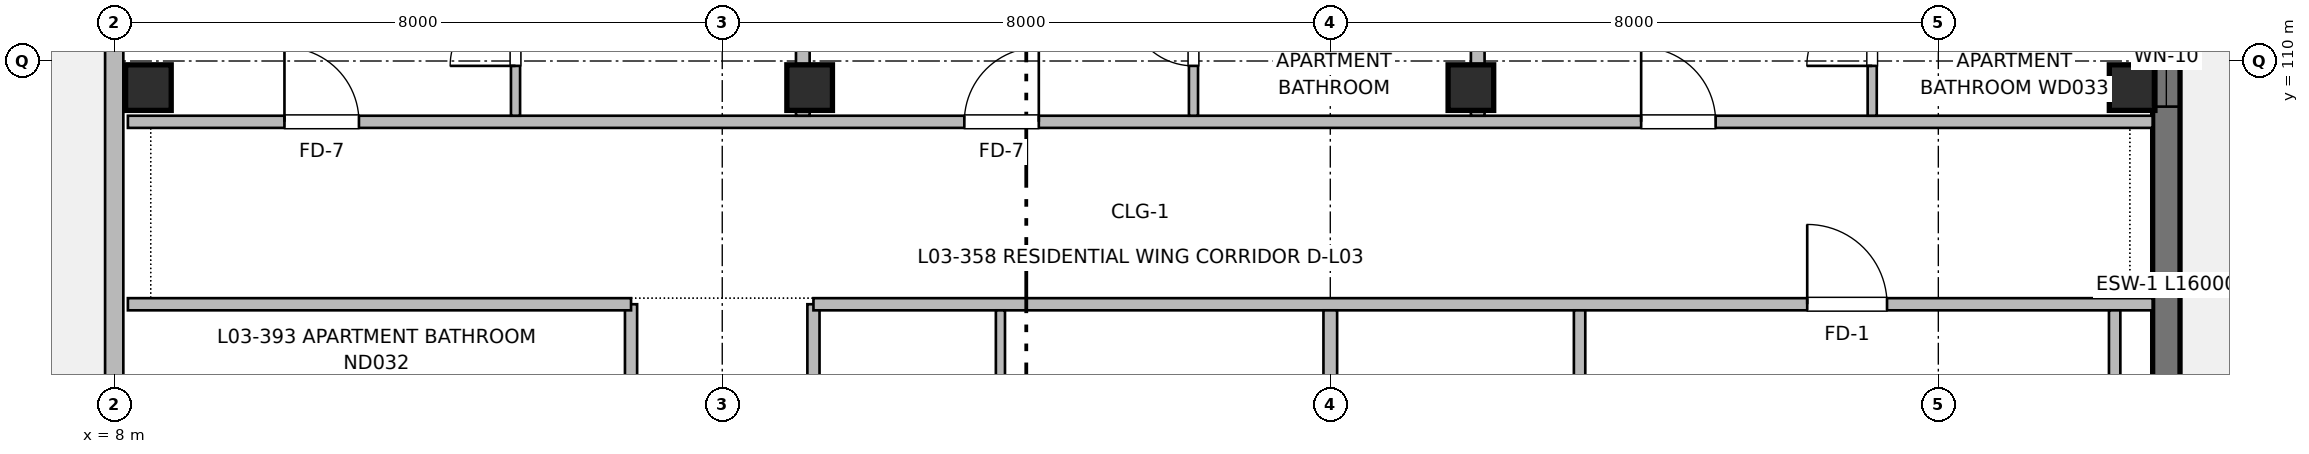
"""IFC4 building model, lengths in metres.
Left out: names, types, materials, properties, quantities, classifications, styles, units other than length and angle.
Written with IfcOpenShell. Run it as: python <this file> out.ifc"""

import sys

from ifc_helpers import new_model, si_unit, direction, frame, frame_2d, origin, origin_2d, place, context, subcontext, project, spatial, rectangle, extrude, element, fill, save


model = new_model("IFC4")
c1 = context("Model", 3, precision=1e-05, world=origin(), true_north=direction((0.0, 1.0)))
c2 = subcontext(c1, "Body", "Model", "MODEL_VIEW")
j1 = project(units=[si_unit("LENGTHUNIT", "METRE"), si_unit("PLANEANGLEUNIT", "RADIAN")], contexts=[c1])
p1 = place(None, origin())
s1 = spatial("IfcSite", under=j1, at=p1, CompositionType="ELEMENT")
p2 = place(p1, origin())
s2 = spatial("IfcBuilding", under=s1, at=p2, CompositionType="ELEMENT")
p3 = place(p2, frame((0.0, 0.0, 10.56)))
s3 = spatial("IfcBuildingStorey", under=s2, at=p3, CompositionType="ELEMENT", Elevation=10.56)
for number, where, z_axis, x_axis in (
    (1, (8.45, 109.65, 0.0), (0.0, 0.0, 1.0), (1.0, 0.0, 0.0)),
    (2, (17.15, 109.65, 0.0), (0.0, 0.0, 1.0), (1.0, 0.0, 0.0)),
    (3, (25.85, 109.65, 0.0), (0.0, 0.0, 1.0), (1.0, 0.0, 0.0)),
    (4, (34.55, 109.65, 0.0), (0.0, 0.0, 1.0), (1.0, 0.0, 0.0)),
):
    element("IfcColumn", number, at=place(p3, frame(where, z_axis=z_axis, x_axis=x_axis)), inside=s3, PredefinedType="COLUMN", context=c2, shape_type="SweptSolid", body=[
        extrude(rectangle(XDim=0.6, YDim=0.6, at=origin_2d()), origin(), (0.0, 0.0, 1.0), 3.2),
    ])
p4 = place(p3, frame((35.0, 116.0, 0.0), z_axis=(0.0, 0.0, 1.0), x_axis=(0.0, -1.0, 0.0)))
e5 = element("IfcWall", 5, at=p4, inside=s3, PredefinedType="SHEAR", context=c2, shape_type="SweptSolid", body=[
    extrude(rectangle(XDim=16.0, YDim=0.36, at=frame_2d((8.0, 0.0))), origin(), (0.0, 0.0, 1.0), 2.98),
])
p5 = place(p4, frame((2.95, 0.0, 0.0)))
e6 = element("IfcOpeningElement", 6, at=p5, cuts=e5, PredefinedType="OPENING", context=c2, shape_type="SweptSolid", body=[
    extrude(rectangle(XDim=1.2, YDim=2.2, at=frame_2d((0.6, 1.1))), frame((0.0, 0.19, 0.0), z_axis=(0.0, -1.0, 0.0), x_axis=(1.0, 0.0, 0.0)), (0.0, 0.0, 1.0), 0.38),
])
p6 = place(p4, frame((5.3, 0.0, 0.82)))
e7 = element("IfcOpeningElement", 7, at=p6, cuts=e5, PredefinedType="OPENING", context=c2, shape_type="SweptSolid", body=[
    extrude(rectangle(XDim=1.3, YDim=1.4, at=frame_2d((0.65, 0.7))), frame((0.0, 0.19, 0.0), z_axis=(0.0, -1.0, 0.0), x_axis=(1.0, 0.0, 0.0)), (0.0, 0.0, 1.0), 0.38),
])
p7 = place(p4, frame((11.3, 0.0, 0.87)))
e8 = element("IfcOpeningElement", 8, at=p7, cuts=e5, PredefinedType="OPENING", context=c2, shape_type="SweptSolid", body=[
    extrude(rectangle(XDim=1.4, YDim=1.35, at=frame_2d((0.7, 0.675))), frame((0.0, 0.19, 0.0), z_axis=(0.0, -1.0, 0.0), x_axis=(1.0, 0.0, 0.0)), (0.0, 0.0, 1.0), 0.38),
])
p8 = place(p3, frame((8.0, 56.0, 0.0), z_axis=(0.0, 0.0, 1.0), x_axis=(0.0, 1.0, 0.0)))
e9 = element("IfcWall", 9, at=p8, inside=s3, PredefinedType="SOLIDWALL", context=c2, shape_type="SweptSolid", body=[
    extrude(rectangle(XDim=60.0, YDim=0.24, at=frame_2d((30.0, 0.0))), origin(), (0.0, 0.0, 1.0), 2.98),
])
p9 = place(p8, frame((4.886, 0.0, 0.0)))
e10 = element("IfcOpeningElement", 10, at=p9, cuts=e9, PredefinedType="OPENING", context=c2, shape_type="SweptSolid", body=[
    extrude(rectangle(XDim=1.2, YDim=2.2, at=frame_2d((0.6, 1.1))), frame((0.0, 0.13, 0.0), z_axis=(0.0, -1.0, 0.0), x_axis=(1.0, 0.0, 0.0)), (0.0, 0.0, 1.0), 0.26),
])
p10 = place(p8, frame((12.157, 0.0, 0.87)))
e11 = element("IfcOpeningElement", 11, at=p10, cuts=e9, PredefinedType="OPENING", context=c2, shape_type="SweptSolid", body=[
    extrude(rectangle(XDim=1.4, YDim=1.35, at=frame_2d((0.7, 0.675))), frame((0.0, 0.13, 0.0), z_axis=(0.0, -1.0, 0.0), x_axis=(1.0, 0.0, 0.0)), (0.0, 0.0, 1.0), 0.26),
])
p11 = place(p8, frame((20.354, 0.0, 0.87)))
e12 = element("IfcOpeningElement", 12, at=p11, cuts=e9, PredefinedType="OPENING", context=c2, shape_type="SweptSolid", body=[
    extrude(rectangle(XDim=1.25, YDim=1.35, at=frame_2d((0.625, 0.675))), frame((0.0, 0.13, 0.0), z_axis=(0.0, -1.0, 0.0), x_axis=(1.0, 0.0, 0.0)), (0.0, 0.0, 1.0), 0.26),
])
p12 = place(p8, frame((29.35, 0.0, 0.82)))
e13 = element("IfcOpeningElement", 13, at=p12, cuts=e9, PredefinedType="OPENING", context=c2, shape_type="SweptSolid", body=[
    extrude(rectangle(XDim=1.3, YDim=1.4, at=frame_2d((0.65, 0.7))), frame((0.0, 0.13, 0.0), z_axis=(0.0, -1.0, 0.0), x_axis=(1.0, 0.0, 0.0)), (0.0, 0.0, 1.0), 0.26),
])
p13 = place(p8, frame((37.521, 0.0, 0.67)))
e14 = element("IfcOpeningElement", 14, at=p13, cuts=e9, PredefinedType="OPENING", context=c2, shape_type="SweptSolid", body=[
    extrude(rectangle(XDim=2.1, YDim=1.55, at=frame_2d((1.05, 0.775))), frame((0.0, 0.13, 0.0), z_axis=(0.0, -1.0, 0.0), x_axis=(1.0, 0.0, 0.0)), (0.0, 0.0, 1.0), 0.26),
])
p14 = place(p8, frame((55.639, 0.0, 0.9)))
e15 = element("IfcOpeningElement", 15, at=p14, cuts=e9, PredefinedType="OPENING", context=c2, shape_type="SweptSolid", body=[
    extrude(rectangle(XDim=1.05, YDim=1.15, at=frame_2d((0.525, 0.575))), frame((0.0, 0.13, 0.0), z_axis=(0.0, -1.0, 0.0), x_axis=(1.0, 0.0, 0.0)), (0.0, 0.0, 1.0), 0.26),
])
p15 = place(p3, frame((14.8, 56.18, 0.0), z_axis=(0.0, 0.0, 1.0), x_axis=(0.0, 1.0, 0.0)))
e16 = element("IfcWall", 16, at=p15, inside=s3, PredefinedType="PARTITIONING", context=c2, shape_type="SweptSolid", body=[
    extrude(rectangle(XDim=50.62, YDim=0.16, at=frame_2d((25.31, 0.0))), origin(), (0.0, 0.0, 1.0), 2.935),
])
p16 = place(p15, frame((12.82, 0.0, 0.0)))
e17 = element("IfcOpeningElement", 17, at=p16, cuts=e16, PredefinedType="OPENING", context=c2, shape_type="SweptSolid", body=[
    extrude(rectangle(XDim=1.1, YDim=2.15, at=frame_2d((0.55, 1.075))), frame((0.0, 0.09, 0.0), z_axis=(0.0, -1.0, 0.0), x_axis=(1.0, 0.0, 0.0)), (0.0, 0.0, 1.0), 0.18),
])
p17 = place(p15, frame((19.22, 0.0, 0.0)))
e18 = element("IfcOpeningElement", 18, at=p17, cuts=e16, PredefinedType="OPENING", context=c2, shape_type="SweptSolid", body=[
    extrude(rectangle(XDim=1.6, YDim=2.15, at=frame_2d((0.8, 1.075))), frame((0.0, 0.09, 0.0), z_axis=(0.0, -1.0, 0.0), x_axis=(1.0, 0.0, 0.0)), (0.0, 0.0, 1.0), 0.18),
])
p18 = place(p15, frame((1.8, 0.0, 0.0)))
e19 = element("IfcOpeningElement", 19, at=p18, cuts=e16, PredefinedType="OPENING", context=c2, shape_type="SweptSolid", body=[
    extrude(rectangle(XDim=0.96, YDim=2.15, at=frame_2d((0.48, 1.075))), frame((0.0, 0.09, 0.0), z_axis=(0.0, -1.0, 0.0), x_axis=(1.0, 0.0, 0.0)), (0.0, 0.0, 1.0), 0.18),
])
p19 = place(p15, frame((32.825, 0.0, 0.0)))
e20 = element("IfcOpeningElement", 20, at=p19, cuts=e16, PredefinedType="OPENING", context=c2, shape_type="SweptSolid", body=[
    extrude(rectangle(XDim=0.98, YDim=2.15, at=frame_2d((0.49, 1.075))), frame((0.0, 0.09, 0.0), z_axis=(0.0, -1.0, 0.0), x_axis=(1.0, 0.0, 0.0)), (0.0, 0.0, 1.0), 0.18),
])
p20 = place(p15, frame((40.635, 0.0, 0.0)))
e21 = element("IfcOpeningElement", 21, at=p20, cuts=e16, PredefinedType="OPENING", context=c2, shape_type="SweptSolid", body=[
    extrude(rectangle(XDim=0.98, YDim=2.15, at=frame_2d((0.49, 1.075))), frame((0.0, 0.09, 0.0), z_axis=(0.0, -1.0, 0.0), x_axis=(1.0, 0.0, 0.0)), (0.0, 0.0, 1.0), 0.18),
])
p21 = place(p3, frame((17.2, 56.18, 0.0), z_axis=(0.0, 0.0, 1.0), x_axis=(0.0, 1.0, 0.0)))
e22 = element("IfcWall", 22, at=p21, inside=s3, PredefinedType="PARTITIONING", context=c2, shape_type="SweptSolid", body=[
    extrude(rectangle(XDim=50.62, YDim=0.16, at=frame_2d((25.31, 0.0))), origin(), (0.0, 0.0, 1.0), 2.935),
])
p22 = place(p21, frame((4.51, 0.0, 0.0)))
e23 = element("IfcOpeningElement", 23, at=p22, cuts=e22, PredefinedType="OPENING", context=c2, shape_type="SweptSolid", body=[
    extrude(rectangle(XDim=1.5, YDim=2.2, at=frame_2d((0.75, 1.1))), frame((0.0, 0.09, 0.0), z_axis=(0.0, -1.0, 0.0), x_axis=(1.0, 0.0, 0.0)), (0.0, 0.0, 1.0), 0.18),
])
p23 = place(p21, frame((16.48, 0.0, 0.0)))
e24 = element("IfcOpeningElement", 24, at=p23, cuts=e22, PredefinedType="OPENING", context=c2, shape_type="SweptSolid", body=[
    extrude(rectangle(XDim=1.02, YDim=2.15, at=frame_2d((0.51, 1.075))), frame((0.0, 0.09, 0.0), z_axis=(0.0, -1.0, 0.0), x_axis=(1.0, 0.0, 0.0)), (0.0, 0.0, 1.0), 0.18),
])
p24 = place(p21, frame((28.53, 0.0, 0.0)))
e25 = element("IfcOpeningElement", 25, at=p24, cuts=e22, PredefinedType="OPENING", context=c2, shape_type="SweptSolid", body=[
    extrude(rectangle(XDim=0.98, YDim=2.15, at=frame_2d((0.49, 1.075))), frame((0.0, 0.09, 0.0), z_axis=(0.0, -1.0, 0.0), x_axis=(1.0, 0.0, 0.0)), (0.0, 0.0, 1.0), 0.18),
])
p25 = place(p21, frame((42.88, 0.0, 0.0)))
e26 = element("IfcOpeningElement", 26, at=p25, cuts=e22, PredefinedType="OPENING", context=c2, shape_type="SweptSolid", body=[
    extrude(rectangle(XDim=0.98, YDim=2.15, at=frame_2d((0.49, 1.075))), frame((0.0, 0.09, 0.0), z_axis=(0.0, -1.0, 0.0), x_axis=(1.0, 0.0, 0.0)), (0.0, 0.0, 1.0), 0.18),
])
p26 = place(p3, frame((8.18, 106.8, 0.0), z_axis=(0.0, 0.0, 1.0), x_axis=(1.0, 0.0, 0.0)))
e27 = element("IfcWall", 27, at=p26, inside=s3, PredefinedType="PARTITIONING", context=c2, shape_type="SweptSolid", body=[
    extrude(rectangle(XDim=6.62, YDim=0.16, at=frame_2d((3.31, 0.0))), origin(), (0.0, 0.0, 1.0), 2.935),
])
p27 = place(p3, frame((17.2, 106.8, 0.0), z_axis=(0.0, 0.0, 1.0), x_axis=(1.0, 0.0, 0.0)))
e28 = element("IfcWall", 28, at=p27, inside=s3, PredefinedType="PARTITIONING", context=c2, shape_type="SweptSolid", body=[
    extrude(rectangle(XDim=17.62, YDim=0.16, at=frame_2d((8.81, 0.0))), origin(), (0.0, 0.0, 1.0), 2.935),
])
p28 = place(p27, frame((13.075, 0.0, 0.0)))
e29 = element("IfcOpeningElement", 29, at=p28, cuts=e28, PredefinedType="OPENING", context=c2, shape_type="SweptSolid", body=[
    extrude(rectangle(XDim=1.05, YDim=2.15, at=frame_2d((0.525, 1.075))), frame((0.0, 0.09, 0.0), z_axis=(0.0, -1.0, 0.0), x_axis=(1.0, 0.0, 0.0)), (0.0, 0.0, 1.0), 0.18),
])
p29 = place(p3, frame((8.18, 109.2, 0.0), z_axis=(0.0, 0.0, 1.0), x_axis=(1.0, 0.0, 0.0)))
e30 = element("IfcWall", 30, at=p29, inside=s3, PredefinedType="PARTITIONING", context=c2, shape_type="SweptSolid", body=[
    extrude(rectangle(XDim=26.64, YDim=0.16, at=frame_2d((13.32, 0.0))), origin(), (0.0, 0.0, 1.0), 2.935),
])
p30 = place(p29, frame((2.06, 0.0, 0.0)))
e31 = element("IfcOpeningElement", 31, at=p30, cuts=e30, PredefinedType="OPENING", context=c2, shape_type="SweptSolid", body=[
    extrude(rectangle(XDim=0.98, YDim=2.15, at=frame_2d((0.49, 1.075))), frame((0.0, 0.09, 0.0), z_axis=(0.0, -1.0, 0.0), x_axis=(1.0, 0.0, 0.0)), (0.0, 0.0, 1.0), 0.18),
])
p31 = place(p29, frame((11.005, 0.0, 0.0)))
e32 = element("IfcOpeningElement", 32, at=p31, cuts=e30, PredefinedType="OPENING", context=c2, shape_type="SweptSolid", body=[
    extrude(rectangle(XDim=0.98, YDim=2.15, at=frame_2d((0.49, 1.075))), frame((0.0, 0.09, 0.0), z_axis=(0.0, -1.0, 0.0), x_axis=(1.0, 0.0, 0.0)), (0.0, 0.0, 1.0), 0.18),
])
p32 = place(p29, frame((19.91, 0.0, 0.0)))
e33 = element("IfcOpeningElement", 33, at=p32, cuts=e30, PredefinedType="OPENING", context=c2, shape_type="SweptSolid", body=[
    extrude(rectangle(XDim=0.98, YDim=2.15, at=frame_2d((0.49, 1.075))), frame((0.0, 0.09, 0.0), z_axis=(0.0, -1.0, 0.0), x_axis=(1.0, 0.0, 0.0)), (0.0, 0.0, 1.0), 0.18),
])
p33 = place(p3, frame((24.0, 100.05, 0.0), z_axis=(0.0, 0.0, 1.0), x_axis=(0.0, 1.0, 0.0)))
e34 = element("IfcWall", 34, at=p33, inside=s3, PredefinedType="PARTITIONING", context=c2, shape_type="SweptSolid", body=[
    extrude(rectangle(XDim=6.67, YDim=0.18, at=frame_2d((3.335, 0.0))), origin(), (0.0, 0.0, 1.0), 2.935),
])
for number, where, z_axis, x_axis in (
    (35, (27.28, 103.99, 0.0), (0.0, 0.0, 1.0), (0.0, 1.0, 0.0)),
    (36, (34.32, 103.99, 0.0), (0.0, 0.0, 1.0), (0.0, 1.0, 0.0)),
):
    element("IfcWall", number, at=place(p3, frame(where, z_axis=z_axis, x_axis=x_axis)), inside=s3, PredefinedType="PARTITIONING", context=c2, shape_type="SweptSolid", body=[
        extrude(rectangle(XDim=2.73, YDim=0.15, at=frame_2d((1.365, 0.0))), origin(), (0.0, 0.0, 1.0), 2.935),
    ])
p34 = place(p3, frame((19.66, 91.14, 0.0), z_axis=(0.0, 0.0, 1.0), x_axis=(0.0, 1.0, 0.0)))
e37 = element("IfcWall", 37, at=p34, inside=s3, PredefinedType="PARTITIONING", context=c2, shape_type="SweptSolid", body=[
    extrude(rectangle(XDim=15.58, YDim=0.12, at=frame_2d((7.79, 0.0))), origin(), (0.0, 0.0, 1.0), 2.935),
])
p35 = place(p34, frame((2.725, 0.0, 0.0)))
e38 = element("IfcOpeningElement", 38, at=p35, cuts=e37, PredefinedType="OPENING", context=c2, shape_type="SweptSolid", body=[
    extrude(rectangle(XDim=0.86, YDim=2.1, at=frame_2d((0.43, 1.05))), frame((0.0, 0.07, 0.0), z_axis=(0.0, -1.0, 0.0), x_axis=(1.0, 0.0, 0.0)), (0.0, 0.0, 1.0), 0.14),
])
p36 = place(p34, frame((9.525, 0.0, 0.0)))
e39 = element("IfcOpeningElement", 39, at=p36, cuts=e37, PredefinedType="OPENING", context=c2, shape_type="SweptSolid", body=[
    extrude(rectangle(XDim=0.92, YDim=2.1, at=frame_2d((0.46, 1.05))), frame((0.0, 0.07, 0.0), z_axis=(0.0, -1.0, 0.0), x_axis=(1.0, 0.0, 0.0)), (0.0, 0.0, 1.0), 0.14),
])
for number, where, z_axis, x_axis in (
    (40, (17.06, 109.28, 0.0), (0.0, 0.0, 1.0), (0.0, 1.0, 0.0)),
    (41, (25.94, 109.28, 0.0), (0.0, 0.0, 1.0), (0.0, 1.0, 0.0)),
):
    element("IfcWall", number, at=place(p3, frame(where, z_axis=z_axis, x_axis=x_axis)), inside=s3, PredefinedType="PARTITIONING", context=c2, shape_type="SweptSolid", body=[
        extrude(rectangle(XDim=6.6, YDim=0.18, at=frame_2d((3.3, 0.0))), origin(), (0.0, 0.0, 1.0), 2.68),
    ])
p37 = place(p3, frame((13.28, 109.28, 0.0), z_axis=(0.0, 0.0, 1.0), x_axis=(0.0, 1.0, 0.0)))
e42 = element("IfcWall", 42, at=p37, inside=s3, PredefinedType="PARTITIONING", context=c2, shape_type="SweptSolid", body=[
    extrude(rectangle(XDim=6.6, YDim=0.12, at=frame_2d((3.3, 0.0))), origin(), (0.0, 0.0, 1.0), 2.935),
])
p38 = place(p37, frame((0.656, 0.0, 0.0)))
e43 = element("IfcOpeningElement", 43, at=p38, cuts=e42, PredefinedType="OPENING", context=c2, shape_type="SweptSolid", body=[
    extrude(rectangle(XDim=0.86, YDim=2.1, at=frame_2d((0.43, 1.05))), frame((0.0, 0.07, 0.0), z_axis=(0.0, -1.0, 0.0), x_axis=(1.0, 0.0, 0.0)), (0.0, 0.0, 1.0), 0.14),
])
p39 = place(p37, frame((4.097, 0.0, 0.0)))
e44 = element("IfcOpeningElement", 44, at=p39, cuts=e42, PredefinedType="OPENING", context=c2, shape_type="SweptSolid", body=[
    extrude(rectangle(XDim=0.9, YDim=2.1, at=frame_2d((0.45, 1.05))), frame((0.0, 0.07, 0.0), z_axis=(0.0, -1.0, 0.0), x_axis=(1.0, 0.0, 0.0)), (0.0, 0.0, 1.0), 0.14),
])
p40 = place(p3, frame((22.2, 109.28, 0.0), z_axis=(0.0, 0.0, 1.0), x_axis=(0.0, 1.0, 0.0)))
e45 = element("IfcWall", 45, at=p40, inside=s3, PredefinedType="PARTITIONING", context=c2, shape_type="SweptSolid", body=[
    extrude(rectangle(XDim=6.6, YDim=0.12, at=frame_2d((3.3, 0.0))), origin(), (0.0, 0.0, 1.0), 2.935),
])
p41 = place(p40, frame((0.656, 0.0, 0.0)))
e46 = element("IfcOpeningElement", 46, at=p41, cuts=e45, PredefinedType="OPENING", context=c2, shape_type="SweptSolid", body=[
    extrude(rectangle(XDim=0.86, YDim=2.1, at=frame_2d((0.43, 1.05))), frame((0.0, 0.07, 0.0), z_axis=(0.0, -1.0, 0.0), x_axis=(1.0, 0.0, 0.0)), (0.0, 0.0, 1.0), 0.14),
])
p42 = place(p40, frame((4.097, 0.0, 0.0)))
e47 = element("IfcOpeningElement", 47, at=p42, cuts=e45, PredefinedType="OPENING", context=c2, shape_type="SweptSolid", body=[
    extrude(rectangle(XDim=0.9, YDim=2.1, at=frame_2d((0.45, 1.05))), frame((0.0, 0.07, 0.0), z_axis=(0.0, -1.0, 0.0), x_axis=(1.0, 0.0, 0.0)), (0.0, 0.0, 1.0), 0.14),
])
p43 = place(p3, frame((31.13, 109.28, 0.0), z_axis=(0.0, 0.0, 1.0), x_axis=(0.0, 1.0, 0.0)))
e48 = element("IfcWall", 48, at=p43, inside=s3, PredefinedType="PARTITIONING", context=c2, shape_type="SweptSolid", body=[
    extrude(rectangle(XDim=6.6, YDim=0.12, at=frame_2d((3.3, 0.0))), origin(), (0.0, 0.0, 1.0), 2.935),
])
p44 = place(p43, frame((0.656, 0.0, 0.0)))
e49 = element("IfcOpeningElement", 49, at=p44, cuts=e48, PredefinedType="OPENING", context=c2, shape_type="SweptSolid", body=[
    extrude(rectangle(XDim=0.86, YDim=2.1, at=frame_2d((0.43, 1.05))), frame((0.0, 0.07, 0.0), z_axis=(0.0, -1.0, 0.0), x_axis=(1.0, 0.0, 0.0)), (0.0, 0.0, 1.0), 0.14),
])
p45 = place(p43, frame((4.097, 0.0, 0.0)))
e50 = element("IfcOpeningElement", 50, at=p45, cuts=e48, PredefinedType="OPENING", context=c2, shape_type="SweptSolid", body=[
    extrude(rectangle(XDim=0.9, YDim=2.1, at=frame_2d((0.45, 1.05))), frame((0.0, 0.07, 0.0), z_axis=(0.0, -1.0, 0.0), x_axis=(1.0, 0.0, 0.0)), (0.0, 0.0, 1.0), 0.14),
])
p46 = place(p6, origin())
e51 = element("IfcWindow", 51, at=p46, inside=s3, PartitioningType="SINGLE_PANEL", PredefinedType="WINDOW", context=c2, shape_type="SweptSolid", body=[
    extrude(rectangle(XDim=1.3, YDim=1.4, at=frame_2d((0.65, 0.7))), frame((0.0, 0.03, 0.0), z_axis=(0.0, -1.0, 0.0), x_axis=(1.0, 0.0, 0.0)), (0.0, 0.0, 1.0), 0.06),
])
fill(e7, e51)
p47 = place(p28, origin())
e52 = element("IfcDoor", 52, at=p47, inside=s3, OperationType="SINGLE_SWING_LEFT", PredefinedType="DOOR", context=c2, shape_type="SweptSolid", body=[
    extrude(rectangle(XDim=1.05, YDim=2.15, at=frame_2d((0.525, 1.075))), frame((0.0, 0.025, 0.0), z_axis=(0.0, -1.0, 0.0), x_axis=(1.0, 0.0, 0.0)), (0.0, 0.0, 1.0), 0.05),
])
fill(e29, e52)
p48 = place(p30, origin())
e53 = element("IfcDoor", 53, at=p48, inside=s3, OperationType="SINGLE_SWING_LEFT", PredefinedType="DOOR", context=c2, shape_type="SweptSolid", body=[
    extrude(rectangle(XDim=0.98, YDim=2.15, at=frame_2d((0.49, 1.075))), frame((0.0, 0.025, 0.0), z_axis=(0.0, -1.0, 0.0), x_axis=(1.0, 0.0, 0.0)), (0.0, 0.0, 1.0), 0.05),
])
fill(e31, e53)
p49 = place(p38, origin())
e54 = element("IfcDoor", 54, at=p49, inside=s3, OperationType="SINGLE_SWING_LEFT", PredefinedType="DOOR", context=c2, shape_type="SweptSolid", body=[
    extrude(rectangle(XDim=0.86, YDim=2.1, at=frame_2d((0.43, 1.05))), frame((0.0, 0.025, 0.0), z_axis=(0.0, -1.0, 0.0), x_axis=(1.0, 0.0, 0.0)), (0.0, 0.0, 1.0), 0.05),
])
fill(e43, e54)
p50 = place(p31, origin())
e55 = element("IfcDoor", 55, at=p50, inside=s3, OperationType="SINGLE_SWING_RIGHT", PredefinedType="DOOR", context=c2, shape_type="SweptSolid", body=[
    extrude(rectangle(XDim=0.98, YDim=2.15, at=frame_2d((0.49, 1.075))), frame((0.0, 0.025, 0.0), z_axis=(0.0, -1.0, 0.0), x_axis=(1.0, 0.0, 0.0)), (0.0, 0.0, 1.0), 0.05),
])
fill(e32, e55)
p51 = place(p41, origin())
e56 = element("IfcDoor", 56, at=p51, inside=s3, OperationType="SINGLE_SWING_RIGHT", PredefinedType="DOOR", context=c2, shape_type="SweptSolid", body=[
    extrude(rectangle(XDim=0.86, YDim=2.1, at=frame_2d((0.43, 1.05))), frame((0.0, 0.025, 0.0), z_axis=(0.0, -1.0, 0.0), x_axis=(1.0, 0.0, 0.0)), (0.0, 0.0, 1.0), 0.05),
])
fill(e46, e56)
p52 = place(p32, origin())
e57 = element("IfcDoor", 57, at=p52, inside=s3, OperationType="SINGLE_SWING_LEFT", PredefinedType="DOOR", context=c2, shape_type="SweptSolid", body=[
    extrude(rectangle(XDim=0.98, YDim=2.15, at=frame_2d((0.49, 1.075))), frame((0.0, 0.025, 0.0), z_axis=(0.0, -1.0, 0.0), x_axis=(1.0, 0.0, 0.0)), (0.0, 0.0, 1.0), 0.05),
])
fill(e33, e57)
p53 = place(p44, origin())
e58 = element("IfcDoor", 58, at=p53, inside=s3, OperationType="SINGLE_SWING_LEFT", PredefinedType="DOOR", context=c2, shape_type="SweptSolid", body=[
    extrude(rectangle(XDim=0.86, YDim=2.1, at=frame_2d((0.43, 1.05))), frame((0.0, 0.025, 0.0), z_axis=(0.0, -1.0, 0.0), x_axis=(1.0, 0.0, 0.0)), (0.0, 0.0, 1.0), 0.05),
])
fill(e49, e58)
save(model, sys.argv[1])
